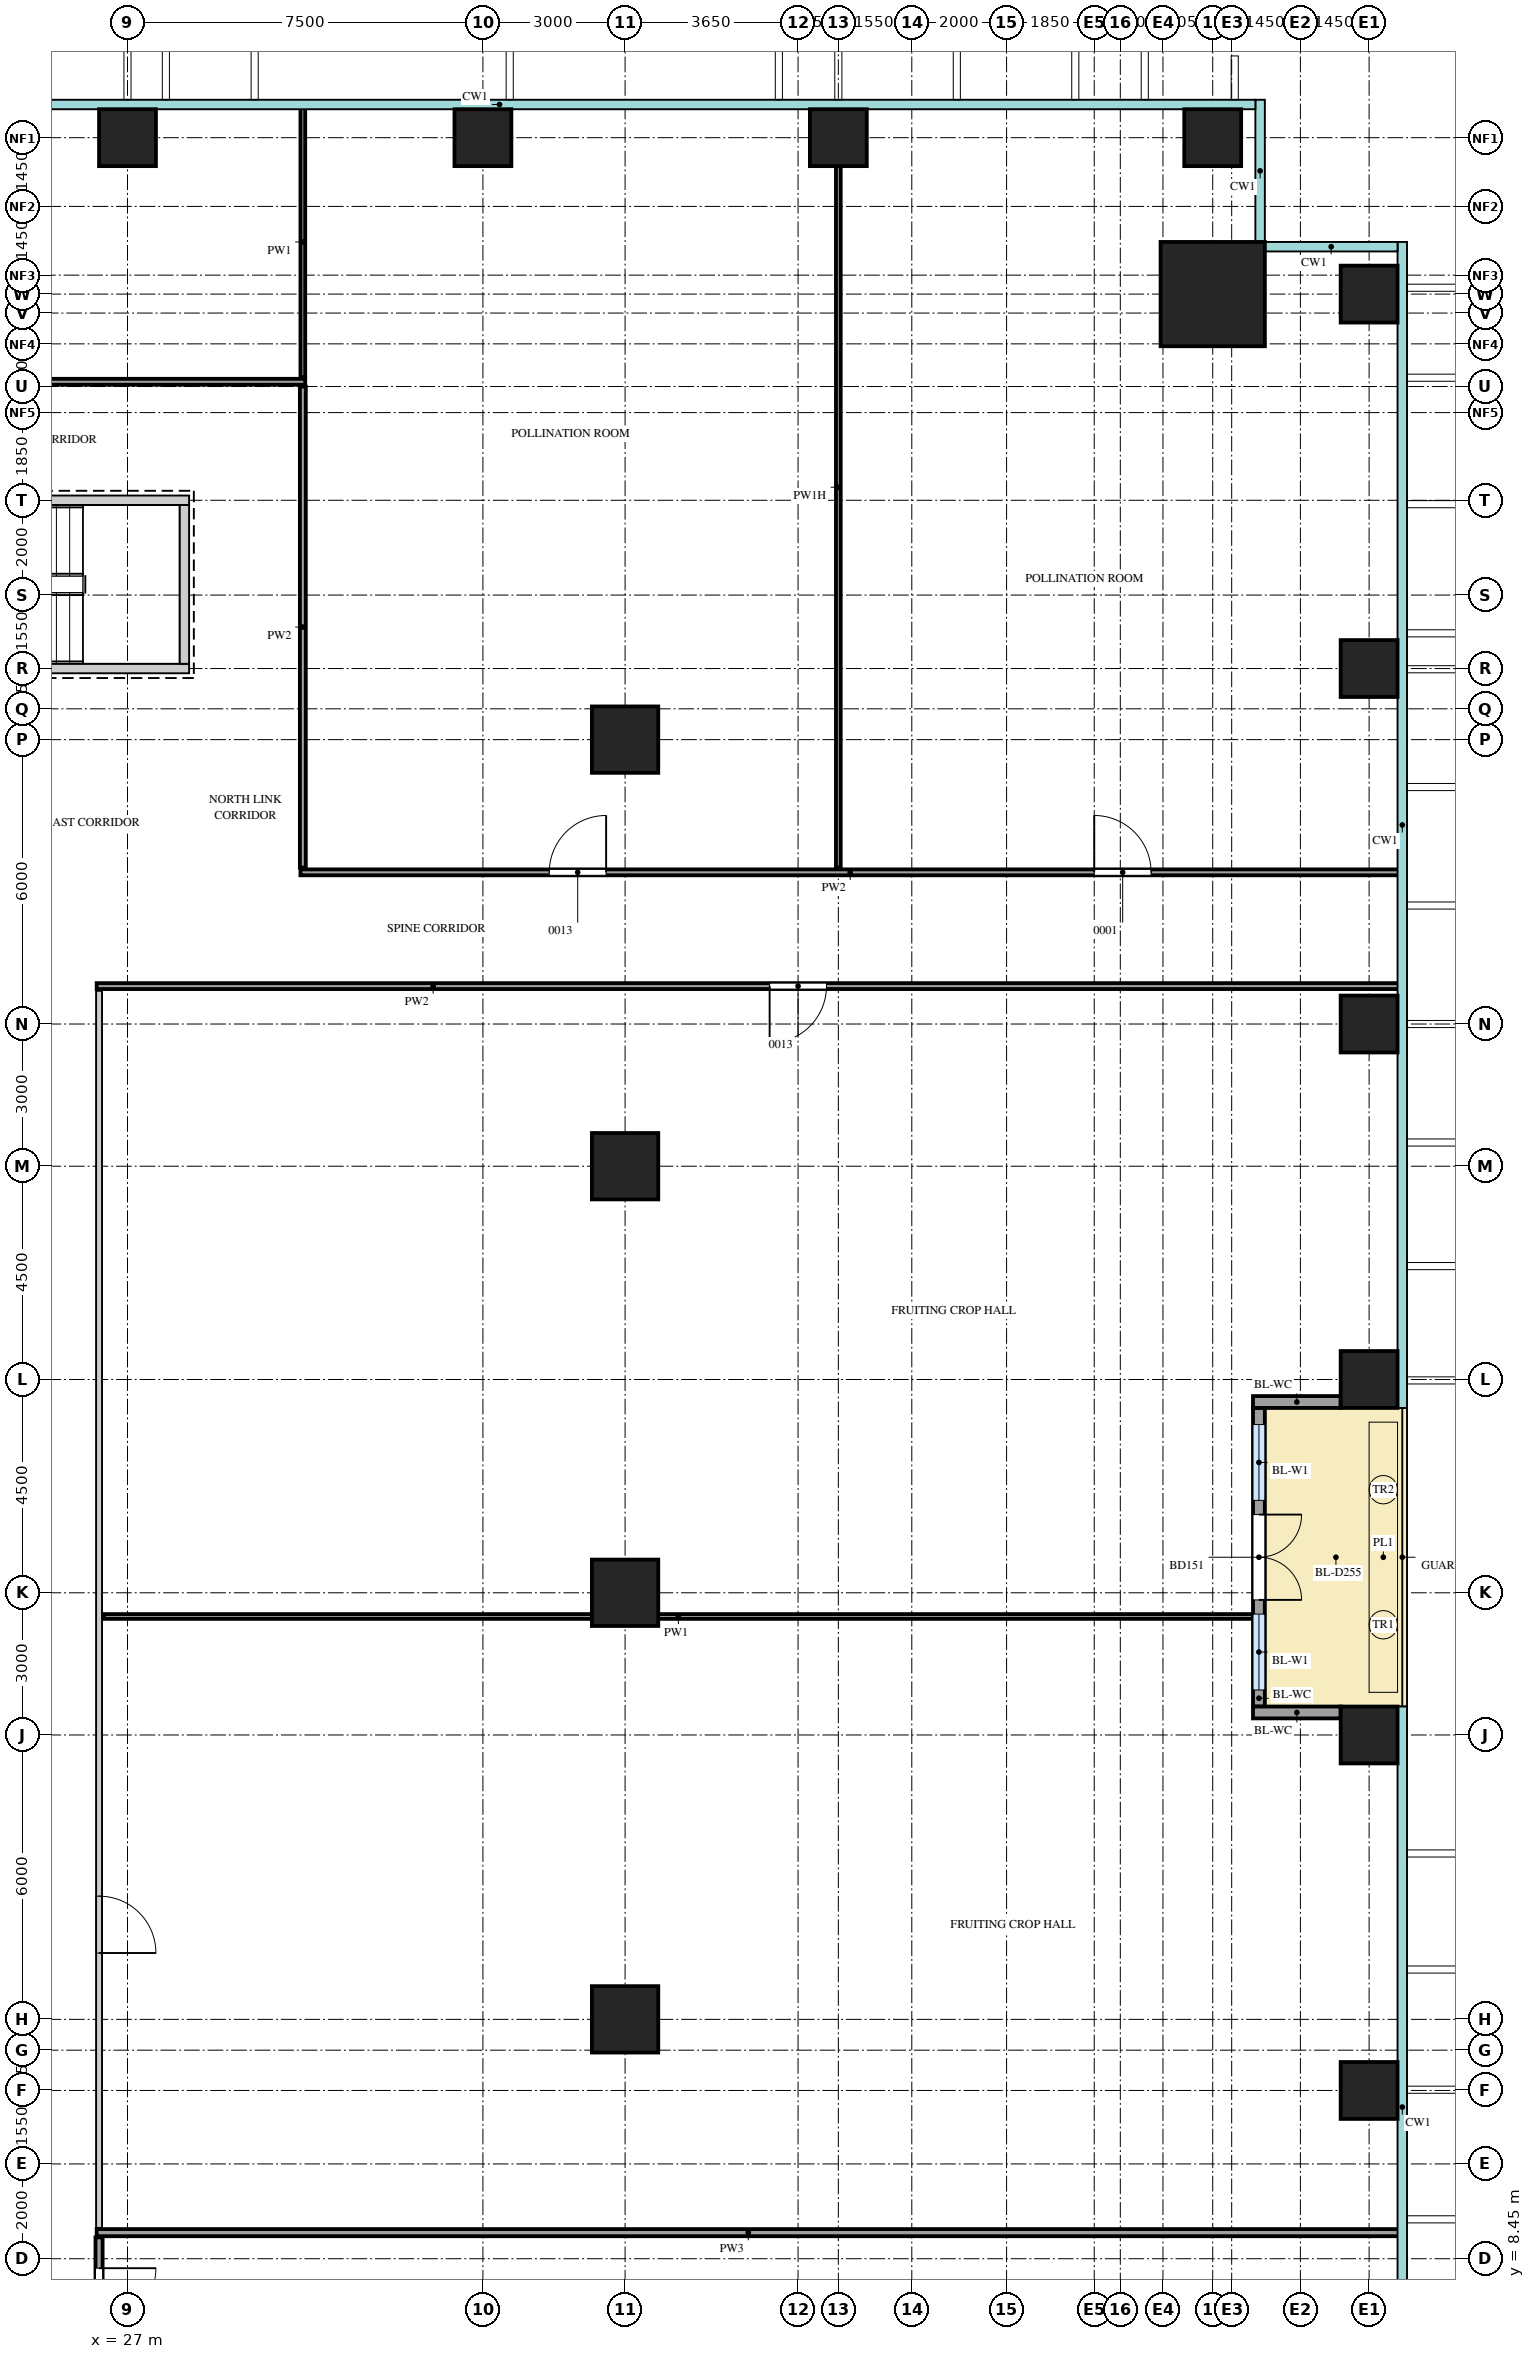
"""IFC4 building model, lengths in metres.
Left out: names, types, materials, properties, quantities, classifications, styles, units other than length and angle.
Written with IfcOpenShell. Run it as: python <this file> out.ifc"""

import sys

from ifc_helpers import new_model, si_unit, direction, frame, frame_2d, origin, origin_2d, place, context, subcontext, project, spatial, rectangle, extrude, source, transform, mapped, element, fill, save


model = new_model("IFC4")
c1 = context("Model", 3, precision=1e-05, world=origin(), true_north=direction((0.0, 1.0)))
c2 = subcontext(c1, "Body", "Model", "MODEL_VIEW")
j1 = project(units=[si_unit("LENGTHUNIT", "METRE"), si_unit("PLANEANGLEUNIT", "RADIAN")], contexts=[c1])
p1 = place(None, origin())
s1 = spatial("IfcSite", under=j1, at=p1, CompositionType="ELEMENT")
p2 = place(p1, origin())
s2 = spatial("IfcBuilding", under=s1, at=p2, CompositionType="ELEMENT")
p3 = place(p2, frame((0.0, 0.0, 73.5)))
s3 = spatial("IfcBuildingStorey", under=s2, at=p3, CompositionType="ELEMENT", Elevation=73.5)
m1 = source(origin(), c2, "Body", "SweptSolid", [
    extrude(rectangle(XDim=7.1, YDim=0.2, at=frame_2d((3.55, 0.0))), origin(), (0.0, 0.0, 1.0), 4.2),
])
p4 = place(p3, frame((21.2, 45.55, 0.0), z_axis=(0.0, 0.0, 1.0), x_axis=(1.0, 0.0, 0.0)))
e1 = element("IfcWall", 1, at=p4, inside=s3, PredefinedType="SHEAR", context=c2, shape_type="MappedRepresentation", body=[
    mapped(m1, transform((0.0, 0.0, 0.0))),
])
m2 = source(origin(), c2, "Body", "SweptSolid", [
    extrude(rectangle(XDim=1.2, YDim=2.1, at=frame_2d((0.6, 1.05))), frame((0.0, 0.11, 0.0), z_axis=(0.0, -1.0, 0.0), x_axis=(1.0, 0.0, 0.0)), (0.0, 0.0, 1.0), 0.22),
])
p5 = place(p4, frame((0.15, 0.0, 0.0)))
e2 = element("IfcOpeningElement", 2, at=p5, cuts=e1, PredefinedType="OPENING", context=c2, shape_type="MappedRepresentation", body=[
    mapped(m2, transform((0.0, 0.0, 0.0))),
])
p6 = place(p3, frame((21.2, 42.0, 0.0), z_axis=(0.0, 0.0, 1.0), x_axis=(1.0, 0.0, 0.0)))
e3 = element("IfcWall", 3, at=p6, inside=s3, PredefinedType="SHEAR", context=c2, shape_type="MappedRepresentation", body=[
    mapped(m1, transform((0.0, 0.0, 0.0))),
])
m3 = source(origin(), c2, "Body", "SweptSolid", [
    extrude(rectangle(XDim=3.35, YDim=0.2, at=frame_2d((1.675, 0.0))), origin(), (0.0, 0.0, 1.0), 4.2),
])
p7 = place(p3, frame((28.2, 42.1, 0.0), z_axis=(0.0, 0.0, 1.0), x_axis=(0.0, 1.0, 0.0)))
e4 = element("IfcWall", 4, at=p7, inside=s3, PredefinedType="SHEAR", context=c2, shape_type="MappedRepresentation", body=[
    mapped(m3, transform((0.0, 0.0, 0.0))),
])
m4 = source(origin(), c2, "Body", "SweptSolid", [
    extrude(rectangle(XDim=2.2, YDim=2.2, at=origin_2d()), origin(), (0.0, 0.0, 1.0), 4.5),
])
p8 = place(p3, frame((49.9, 49.9, 0.0), z_axis=(0.0, 0.0, 1.0), x_axis=(1.0, 0.0, 0.0)))
e5 = element("IfcColumn", 5, at=p8, inside=s3, PredefinedType="COLUMN", context=c2, shape_type="MappedRepresentation", body=[
    mapped(m4, transform((0.0, 0.0, 0.0))),
])
m5 = source(origin(), c2, "Body", "SweptSolid", [
    extrude(rectangle(XDim=1.2, YDim=1.2, at=origin_2d()), origin(), (0.0, 0.0, 1.0), 4.2),
])
for number, where, z_axis, x_axis in (
    (6, (53.2, 12.0, 0.0), (0.0, 0.0, 1.0), (1.0, 0.0, 0.0)),
    (7, (53.2, 19.5, 0.0), (0.0, 0.0, 1.0), (1.0, 0.0, 0.0)),
    (8, (53.2, 27.0, 0.0), (0.0, 0.0, 1.0), (1.0, 0.0, 0.0)),
    (9, (53.2, 34.5, 0.0), (0.0, 0.0, 1.0), (1.0, 0.0, 0.0)),
    (10, (53.2, 42.0, 0.0), (0.0, 0.0, 1.0), (1.0, 0.0, 0.0)),
    (11, (53.2, 49.9, 0.0), (0.0, 0.0, 1.0), (1.0, 0.0, 0.0)),
    (12, (27.0, 53.2, 0.0), (0.0, 0.0, 1.0), (1.0, 0.0, 0.0)),
    (13, (34.5, 53.2, 0.0), (0.0, 0.0, 1.0), (1.0, 0.0, 0.0)),
    (14, (42.0, 53.2, 0.0), (0.0, 0.0, 1.0), (1.0, 0.0, 0.0)),
    (15, (49.9, 53.2, 0.0), (0.0, 0.0, 1.0), (1.0, 0.0, 0.0)),
):
    element("IfcColumn", number, at=place(p3, frame(where, z_axis=z_axis, x_axis=x_axis)), inside=s3, PredefinedType="COLUMN", context=c2, shape_type="MappedRepresentation", body=[
        mapped(m5, transform((0.0, 0.0, 0.0))),
    ])
m6 = source(origin(), c2, "Body", "SweptSolid", [
    extrude(rectangle(XDim=1.4, YDim=1.4, at=origin_2d()), origin(), (0.0, 0.0, 1.0), 4.2),
])
for number, where, z_axis, x_axis in (
    (16, (37.5, 13.5, 0.0), (0.0, 0.0, 1.0), (1.0, 0.0, 0.0)),
    (17, (37.5, 22.5, 0.0), (0.0, 0.0, 1.0), (1.0, 0.0, 0.0)),
    (18, (37.5, 31.5, 0.0), (0.0, 0.0, 1.0), (1.0, 0.0, 0.0)),
    (19, (37.5, 40.5, 0.0), (0.0, 0.0, 1.0), (1.0, 0.0, 0.0)),
):
    element("IfcColumn", number, at=place(p3, frame(where, z_axis=z_axis, x_axis=x_axis)), inside=s3, PredefinedType="COLUMN", context=c2, shape_type="MappedRepresentation", body=[
        mapped(m6, transform((0.0, 0.0, 0.0))),
    ])
m7 = source(origin(), c2, "Body", "SweptSolid", [
    extrude(rectangle(XDim=6.3, YDim=0.25, at=frame_2d((3.15, 0.0))), origin(), (0.0, 0.0, 1.0), 3.6),
])
p9 = place(p3, frame((50.875, 20.1, 0.0), z_axis=(0.0, 0.0, 1.0), x_axis=(0.0, 1.0, 0.0)))
e20 = element("IfcWall", 20, at=p9, inside=s3, PredefinedType="SOLIDWALL", context=c2, shape_type="MappedRepresentation", body=[
    mapped(m7, transform((0.0, 0.0, 0.0))),
])
m8 = source(origin(), c2, "Body", "SweptSolid", [
    extrude(rectangle(XDim=1.6, YDim=2.4, at=frame_2d((0.8, 1.2))), frame((0.0, 0.135, 0.0), z_axis=(0.0, -1.0, 0.0), x_axis=(1.0, 0.0, 0.0)), (0.0, 0.0, 1.0), 0.27),
])
p10 = place(p9, frame((0.35, 0.0, 0.0)))
e21 = element("IfcOpeningElement", 21, at=p10, cuts=e20, PredefinedType="OPENING", context=c2, shape_type="MappedRepresentation", body=[
    mapped(m8, transform((0.0, 0.0, 0.0))),
])
p11 = place(p9, frame((4.35, 0.0, 0.0)))
e22 = element("IfcOpeningElement", 22, at=p11, cuts=e20, PredefinedType="OPENING", context=c2, shape_type="MappedRepresentation", body=[
    mapped(m8, transform((0.0, 0.0, 0.0))),
])
m9 = source(origin(), c2, "Body", "SweptSolid", [
    extrude(rectangle(XDim=1.8, YDim=2.4, at=frame_2d((0.9, 1.2))), frame((0.0, 0.135, 0.0), z_axis=(0.0, -1.0, 0.0), x_axis=(1.0, 0.0, 0.0)), (0.0, 0.0, 1.0), 0.27),
])
p12 = place(p9, frame((2.25, 0.0, 0.0)))
e23 = element("IfcOpeningElement", 23, at=p12, cuts=e20, PredefinedType="OPENING", context=c2, shape_type="MappedRepresentation", body=[
    mapped(m9, transform((0.0, 0.0, 0.0))),
])
m10 = source(origin(), c2, "Body", "SweptSolid", [
    extrude(rectangle(XDim=1.85, YDim=0.25, at=frame_2d((0.925, 0.0))), origin(), (0.0, 0.0, 1.0), 3.6),
])
for number, where, z_axis, x_axis in (
    (24, (52.6, 19.975, 0.0), (0.0, 0.0, 1.0), (-1.0, 0.0, 0.0)),
    (25, (52.6, 26.525, 0.0), (0.0, 0.0, 1.0), (-1.0, 0.0, 0.0)),
):
    element("IfcWall", number, at=place(p3, frame(where, z_axis=z_axis, x_axis=x_axis)), inside=s3, PredefinedType="SOLIDWALL", context=c2, shape_type="MappedRepresentation", body=[
        mapped(m10, transform((0.0, 0.0, 0.0))),
    ])
m11 = source(origin(), c2, "Body", "SweptSolid", [
    extrude(rectangle(XDim=8.75, YDim=0.15, at=frame_2d((4.375, 0.0))), origin(), (0.0, 0.0, 1.0), 4.3),
])
p13 = place(p3, frame((26.4, 0.15, 0.0), z_axis=(0.0, 0.0, 1.0), x_axis=(0.0, 1.0, 0.0)))
e26 = element("IfcWall", 26, at=p13, inside=s3, PredefinedType="PARTITIONING", context=c2, shape_type="MappedRepresentation", body=[
    mapped(m11, transform((0.0, 0.0, 0.0))),
])
m12 = source(origin(), c2, "Body", "SweptSolid", [
    extrude(rectangle(XDim=1.2, YDim=2.1, at=frame_2d((0.6, 1.05))), frame((0.0, 0.085, 0.0), z_axis=(0.0, -1.0, 0.0), x_axis=(1.0, 0.0, 0.0)), (0.0, 0.0, 1.0), 0.17),
])
p14 = place(p13, frame((6.9, 0.0, 0.0)))
e27 = element("IfcOpeningElement", 27, at=p14, cuts=e26, PredefinedType="OPENING", context=c2, shape_type="MappedRepresentation", body=[
    mapped(m12, transform((0.0, 0.0, 0.0))),
])
m13 = source(origin(), c2, "Body", "SweptSolid", [
    extrude(rectangle(XDim=27.5, YDim=0.15, at=frame_2d((13.75, 0.0))), origin(), (0.0, 0.0, 1.0), 4.3),
])
p15 = place(p3, frame((26.35, 9.0, 0.0), z_axis=(0.0, 0.0, 1.0), x_axis=(1.0, 0.0, 0.0)))
e28 = element("IfcWall", 28, at=p15, inside=s3, PredefinedType="PARTITIONING", context=c2, shape_type="MappedRepresentation", body=[
    mapped(m13, transform((0.0, 0.0, 0.0))),
])
m14 = source(origin(), c2, "Body", "SweptSolid", [
    extrude(rectangle(XDim=26.1, YDim=0.125, at=frame_2d((13.05, 0.0))), origin(), (0.0, 0.0, 1.0), 4.3),
])
p16 = place(p3, frame((26.4, 9.1, 0.0), z_axis=(0.0, 0.0, 1.0), x_axis=(0.0, 1.0, 0.0)))
e29 = element("IfcWall", 29, at=p16, inside=s3, PredefinedType="PARTITIONING", context=c2, shape_type="MappedRepresentation", body=[
    mapped(m14, transform((0.0, 0.0, 0.0))),
])
m15 = source(origin(), c2, "Body", "SweptSolid", [
    extrude(rectangle(XDim=1.2, YDim=2.1, at=frame_2d((0.6, 1.05))), frame((0.0, 0.073, 0.0), z_axis=(0.0, -1.0, 0.0), x_axis=(1.0, 0.0, 0.0)), (0.0, 0.0, 1.0), 0.145),
])
p17 = place(p16, frame((5.8, 0.0, 0.0)))
e30 = element("IfcOpeningElement", 30, at=p17, cuts=e29, PredefinedType="OPENING", context=c2, shape_type="MappedRepresentation", body=[
    mapped(m15, transform((0.0, 0.0, 0.0))),
])
m16 = source(origin(), c2, "Body", "SweptSolid", [
    extrude(rectangle(XDim=24.25, YDim=0.1, at=frame_2d((12.125, 0.0))), origin(), (0.0, 0.0, 1.0), 4.3),
])
p18 = place(p3, frame((26.5, 22.0, 0.0), z_axis=(0.0, 0.0, 1.0), x_axis=(1.0, 0.0, 0.0)))
e31 = element("IfcWall", 31, at=p18, inside=s3, PredefinedType="PARTITIONING", context=c2, shape_type="MappedRepresentation", body=[
    mapped(m16, transform((0.0, 0.0, 0.0))),
])
m17 = source(origin(), c2, "Body", "SweptSolid", [
    extrude(rectangle(XDim=27.5, YDim=0.125, at=frame_2d((13.75, 0.0))), origin(), (0.0, 0.0, 1.0), 4.3),
])
p19 = place(p3, frame((26.35, 35.3, 0.0), z_axis=(0.0, 0.0, 1.0), x_axis=(1.0, 0.0, 0.0)))
e32 = element("IfcWall", 32, at=p19, inside=s3, PredefinedType="PARTITIONING", context=c2, shape_type="MappedRepresentation", body=[
    mapped(m17, transform((0.0, 0.0, 0.0))),
])
p20 = place(p19, frame((14.2, 0.0, 0.0)))
e33 = element("IfcOpeningElement", 33, at=p20, cuts=e32, PredefinedType="OPENING", context=c2, shape_type="MappedRepresentation", body=[
    mapped(m15, transform((0.0, 0.0, 0.0))),
])
m18 = source(origin(), c2, "Body", "SweptSolid", [
    extrude(rectangle(XDim=23.2, YDim=0.125, at=frame_2d((11.6, 0.0))), origin(), (0.0, 0.0, 1.0), 4.3),
])
p21 = place(p3, frame((30.65, 37.7, 0.0), z_axis=(0.0, 0.0, 1.0), x_axis=(1.0, 0.0, 0.0)))
e34 = element("IfcWall", 34, at=p21, inside=s3, PredefinedType="PARTITIONING", context=c2, shape_type="MappedRepresentation", body=[
    mapped(m18, transform((0.0, 0.0, 0.0))),
])
p22 = place(p21, frame((5.25, 0.0, 0.0)))
e35 = element("IfcOpeningElement", 35, at=p22, cuts=e34, PredefinedType="OPENING", context=c2, shape_type="MappedRepresentation", body=[
    mapped(m15, transform((0.0, 0.0, 0.0))),
])
p23 = place(p21, frame((16.75, 0.0, 0.0)))
e36 = element("IfcOpeningElement", 36, at=p23, cuts=e34, PredefinedType="OPENING", context=c2, shape_type="MappedRepresentation", body=[
    mapped(m15, transform((0.0, 0.0, 0.0))),
])
m19 = source(origin(), c2, "Body", "SweptSolid", [
    extrude(rectangle(XDim=10.15, YDim=0.125, at=frame_2d((5.075, 0.0))), origin(), (0.0, 0.0, 1.0), 4.3),
])
p24 = place(p3, frame((30.7, 37.8, 0.0), z_axis=(0.0, 0.0, 1.0), x_axis=(0.0, 1.0, 0.0)))
e37 = element("IfcWall", 37, at=p24, inside=s3, PredefinedType="PARTITIONING", context=c2, shape_type="MappedRepresentation", body=[
    mapped(m19, transform((0.0, 0.0, 0.0))),
])
m20 = source(origin(), c2, "Body", "SweptSolid", [
    extrude(rectangle(XDim=16.05, YDim=0.1, at=frame_2d((8.025, 0.0))), origin(), (0.0, 0.0, 1.0), 3.7),
])
p25 = place(p3, frame((42.0, 37.8, 0.0), z_axis=(0.0, 0.0, 1.0), x_axis=(0.0, 1.0, 0.0)))
e38 = element("IfcWall", 38, at=p25, inside=s3, PredefinedType="PARTITIONING", context=c2, shape_type="MappedRepresentation", body=[
    mapped(m20, transform((0.0, 0.0, 0.0))),
])
m21 = source(origin(), c2, "Body", "SweptSolid", [
    extrude(rectangle(XDim=18.8, YDim=0.125, at=frame_2d((9.4, 0.0))), origin(), (0.0, 0.0, 1.0), 4.3),
])
p26 = place(p3, frame((11.95, 48.05, 0.0), z_axis=(0.0, 0.0, 1.0), x_axis=(1.0, 0.0, 0.0)))
e39 = element("IfcWall", 39, at=p26, inside=s3, PredefinedType="PARTITIONING", context=c2, shape_type="MappedRepresentation", body=[
    mapped(m21, transform((0.0, 0.0, 0.0))),
])
p27 = place(p26, frame((8.8, 0.0, 0.0)))
e40 = element("IfcOpeningElement", 40, at=p27, cuts=e39, PredefinedType="OPENING", context=c2, shape_type="MappedRepresentation", body=[
    mapped(m15, transform((0.0, 0.0, 0.0))),
])
m22 = source(origin(), c2, "Body", "SweptSolid", [
    extrude(rectangle(XDim=5.7, YDim=0.1, at=frame_2d((2.85, 0.0))), origin(), (0.0, 0.0, 1.0), 4.3),
])
p28 = place(p3, frame((30.7, 48.15, 0.0), z_axis=(0.0, 0.0, 1.0), x_axis=(0.0, 1.0, 0.0)))
e41 = element("IfcWall", 41, at=p28, inside=s3, PredefinedType="PARTITIONING", context=c2, shape_type="MappedRepresentation", body=[
    mapped(m22, transform((0.0, 0.0, 0.0))),
])
m23 = source(origin(), c2, "Body", "SweptSolid", [
    extrude(rectangle(XDim=1.6, YDim=2.4, at=frame_2d((0.8, 1.2))), frame((0.0, 0.03, 0.0), z_axis=(0.0, -1.0, 0.0), x_axis=(1.0, 0.0, 0.0)), (0.0, 0.0, 1.0), 0.06),
])
p29 = place(p10, origin())
e42 = element("IfcWindow", 42, at=p29, inside=s3, PartitioningType="SINGLE_PANEL", PredefinedType="WINDOW", context=c2, shape_type="MappedRepresentation", body=[
    mapped(m23, transform((0.0, 0.0, 0.0))),
])
fill(e21, e42)
p30 = place(p11, origin())
e43 = element("IfcWindow", 43, at=p30, inside=s3, PartitioningType="SINGLE_PANEL", PredefinedType="WINDOW", context=c2, shape_type="MappedRepresentation", body=[
    mapped(m23, transform((0.0, 0.0, 0.0))),
])
fill(e22, e43)
m24 = source(origin(), c2, "Body", "SweptSolid", [
    extrude(rectangle(XDim=1.8, YDim=2.4, at=frame_2d((0.9, 1.2))), frame((0.0, 0.025, 0.0), z_axis=(0.0, -1.0, 0.0), x_axis=(1.0, 0.0, 0.0)), (0.0, 0.0, 1.0), 0.05),
])
p31 = place(p12, origin())
e44 = element("IfcDoor", 44, at=p31, inside=s3, OperationType="DOUBLE_DOOR_DOUBLE_SWING", PredefinedType="DOOR", context=c2, shape_type="MappedRepresentation", body=[
    mapped(m24, transform((0.0, 0.0, 0.0))),
])
fill(e23, e44)
m25 = source(origin(), c2, "Body", "SweptSolid", [
    extrude(rectangle(XDim=1.2, YDim=2.1, at=frame_2d((0.6, 1.05))), frame((0.0, 0.025, 0.0), z_axis=(0.0, -1.0, 0.0), x_axis=(1.0, 0.0, 0.0)), (0.0, 0.0, 1.0), 0.05),
])
p32 = place(p14, origin())
e45 = element("IfcDoor", 45, at=p32, inside=s3, OperationType="SINGLE_SWING_RIGHT", PredefinedType="DOOR", context=c2, shape_type="MappedRepresentation", body=[
    mapped(m25, transform((0.0, 0.0, 0.0))),
])
fill(e27, e45)
p33 = place(p17, origin())
e46 = element("IfcDoor", 46, at=p33, inside=s3, OperationType="SINGLE_SWING_LEFT", PredefinedType="DOOR", context=c2, shape_type="MappedRepresentation", body=[
    mapped(m25, transform((0.0, 0.0, 0.0))),
])
fill(e30, e46)
p34 = place(p20, origin())
e47 = element("IfcDoor", 47, at=p34, inside=s3, OperationType="SINGLE_SWING_LEFT", PredefinedType="DOOR", context=c2, shape_type="MappedRepresentation", body=[
    mapped(m25, transform((0.0, 0.0, 0.0))),
])
fill(e33, e47)
p35 = place(p22, origin())
e48 = element("IfcDoor", 48, at=p35, inside=s3, OperationType="SINGLE_SWING_LEFT", PredefinedType="DOOR", context=c2, shape_type="MappedRepresentation", body=[
    mapped(m25, transform((0.0, 0.0, 0.0))),
])
fill(e35, e48)
p36 = place(p23, origin())
e49 = element("IfcDoor", 49, at=p36, inside=s3, OperationType="SINGLE_SWING_RIGHT", PredefinedType="DOOR", context=c2, shape_type="MappedRepresentation", body=[
    mapped(m25, transform((0.0, 0.0, 0.0))),
])
fill(e36, e49)
save(model, sys.argv[1])
